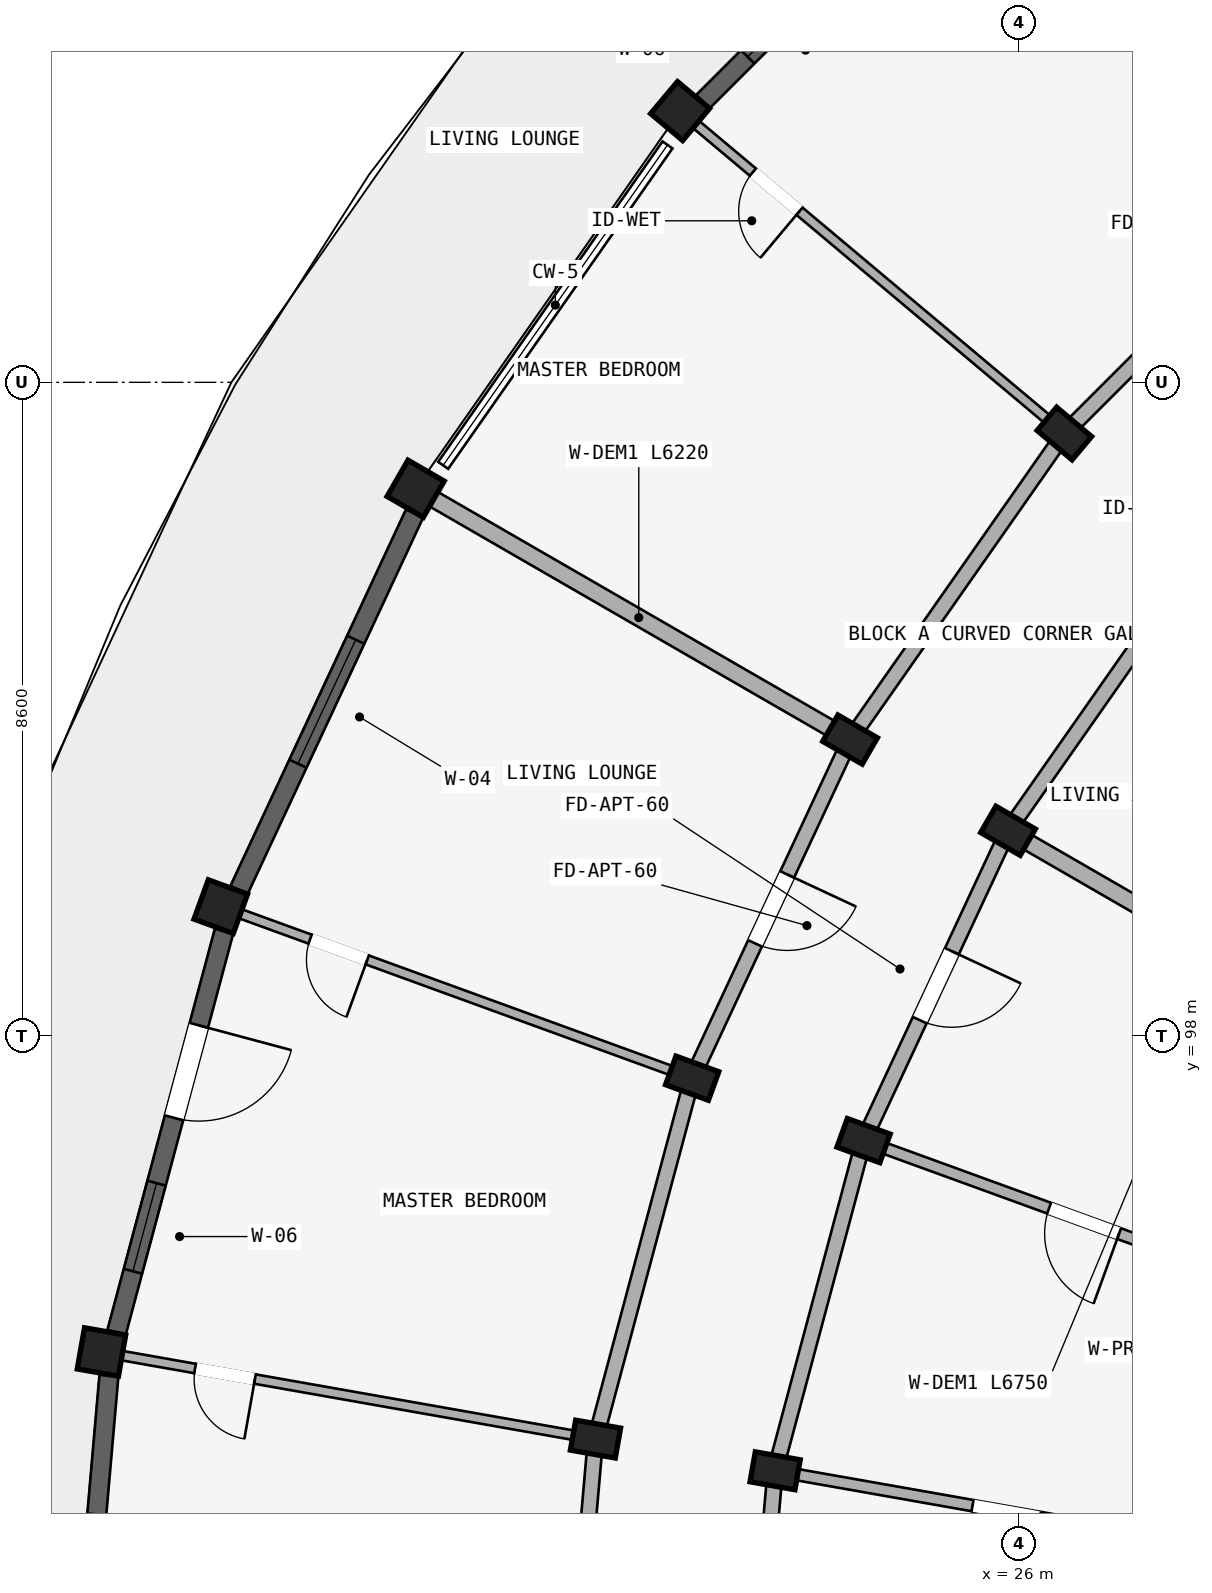
"""IFC4 building model, lengths in metres.
Left out: names, types, materials, properties, quantities, classifications, styles, units other than length and angle.
Written with IfcOpenShell. Run it as: python <this file> out.ifc"""

import sys

from ifc_helpers import new_model, si_unit, direction, frame, frame_2d, origin, origin_2d, place, context, subcontext, project, spatial, rectangle, extrude, element, fill, save


model = new_model("IFC4")
c1 = context("Model", 3, precision=1e-05, world=origin(), true_north=direction((0.0, 1.0)))
c2 = subcontext(c1, "Body", "Model", "MODEL_VIEW")
j1 = project(units=[si_unit("LENGTHUNIT", "METRE"), si_unit("PLANEANGLEUNIT", "RADIAN")], contexts=[c1])
p1 = place(None, origin())
s1 = spatial("IfcSite", under=j1, at=p1, CompositionType="ELEMENT")
p2 = place(p1, origin())
s2 = spatial("IfcBuilding", under=s1, at=p2, CompositionType="ELEMENT")
p3 = place(p2, frame((0.0, 0.0, 49.65)))
s3 = spatial("IfcBuildingStorey", under=s2, at=p3, CompositionType="ELEMENT", Elevation=49.65)
p4 = place(p3, frame((26.598, 105.927, 0.0), z_axis=(0.0, 0.0, 1.0), x_axis=(0.642787609687, 0.766044443119, 0.0)))
e1 = element("IfcColumn", 1, at=p4, inside=s3, PredefinedType="COLUMN", context=c2, shape_type="SweptSolid", body=[
    extrude(rectangle(XDim=0.4, YDim=0.6, at=origin_2d()), origin(), (0.0, 0.0, 1.0), 2.91),
])
p5 = place(p3, frame((21.542, 110.169, 0.0), z_axis=(0.0, 0.0, 1.0), x_axis=(0.642787609687, 0.766044443119, 0.0)))
e2 = element("IfcColumn", 2, at=p5, inside=s3, PredefinedType="COLUMN", context=c2, shape_type="SweptSolid", body=[
    extrude(rectangle(XDim=0.55, YDim=0.55, at=origin_2d()), origin(), (0.0, 0.0, 1.0), 2.91),
])
for number, where, z_axis, x_axis in (
    (3, (25.856, 100.7, 0.0), (0.0, 0.0, 1.0), (0.5, 0.866, 0.0)),
    (4, (23.778, 101.9, 0.0), (0.0, 0.0, 1.0), (0.5, 0.866, 0.0)),
):
    element("IfcColumn", number, at=place(p3, frame(where, z_axis=z_axis, x_axis=x_axis)), inside=s3, PredefinedType="COLUMN", context=c2, shape_type="SweptSolid", body=[
        extrude(rectangle(XDim=0.4, YDim=0.6, at=origin_2d()), origin(), (0.0, 0.0, 1.0), 2.91),
    ])
p6 = place(p3, frame((18.062, 105.2, 0.0), z_axis=(0.0, 0.0, 1.0), x_axis=(0.5, 0.866025403784, 0.0)))
e5 = element("IfcColumn", 5, at=p6, inside=s3, PredefinedType="COLUMN", context=c2, shape_type="SweptSolid", body=[
    extrude(rectangle(XDim=0.55, YDim=0.55, at=origin_2d()), origin(), (0.0, 0.0, 1.0), 2.91),
])
for number, where, z_axis, x_axis in (
    (6, (23.956, 96.624, 0.0), (0.0, 0.0, 1.0), (0.342, 0.94, 0.0)),
    (7, (21.701, 97.445, 0.0), (0.0, 0.0, 1.0), (0.342, 0.94, 0.0)),
):
    element("IfcColumn", number, at=place(p3, frame(where, z_axis=z_axis, x_axis=x_axis)), inside=s3, PredefinedType="COLUMN", context=c2, shape_type="SweptSolid", body=[
        extrude(rectangle(XDim=0.4, YDim=0.6, at=origin_2d()), origin(), (0.0, 0.0, 1.0), 2.91),
    ])
p7 = place(p3, frame((15.499, 99.702, 0.0), z_axis=(0.0, 0.0, 1.0), x_axis=(0.342020143326, 0.939692620786, 0.0)))
e8 = element("IfcColumn", 8, at=p7, inside=s3, PredefinedType="COLUMN", context=c2, shape_type="SweptSolid", body=[
    extrude(rectangle(XDim=0.55, YDim=0.55, at=origin_2d()), origin(), (0.0, 0.0, 1.0), 2.91),
])
for number, where, z_axis, x_axis in (
    (9, (22.792, 92.28, 0.0), (0.0, 0.0, 1.0), (0.174, 0.985, 0.0)),
    (10, (20.428, 92.697, 0.0), (0.0, 0.0, 1.0), (0.174, 0.985, 0.0)),
):
    element("IfcColumn", number, at=place(p3, frame(where, z_axis=z_axis, x_axis=x_axis)), inside=s3, PredefinedType="COLUMN", context=c2, shape_type="SweptSolid", body=[
        extrude(rectangle(XDim=0.4, YDim=0.6, at=origin_2d()), origin(), (0.0, 0.0, 1.0), 2.91),
    ])
p8 = place(p3, frame((13.929, 93.843, 0.0), z_axis=(0.0, 0.0, 1.0), x_axis=(0.173648177667, 0.984807753012, 0.0)))
e11 = element("IfcColumn", 11, at=p8, inside=s3, PredefinedType="COLUMN", context=c2, shape_type="SweptSolid", body=[
    extrude(rectangle(XDim=0.55, YDim=0.55, at=origin_2d()), origin(), (0.0, 0.0, 1.0), 2.91),
])
p9 = place(p3, frame((30.073, 109.402, 0.0), z_axis=(0.0, 0.0, 1.0), x_axis=(-0.707106781187, -0.707106781187, 0.0)))
e12 = element("IfcWall", 12, at=p9, inside=s3, PredefinedType="STANDARD", context=c2, shape_type="SweptSolid", body=[
    extrude(rectangle(XDim=4.916, YDim=0.2, at=frame_2d((2.458, 0.0))), origin(), (0.0, 0.0, 1.0), 2.352),
])
p10 = place(p9, frame((1.888, 0.0, 0.0)))
e13 = element("IfcOpeningElement", 13, at=p10, cuts=e12, PredefinedType="OPENING", context=c2, shape_type="SweptSolid", body=[
    extrude(rectangle(XDim=1.14, YDim=2.15, at=frame_2d((0.57, 1.075))), frame((0.0, 0.11, 0.0), z_axis=(0.0, -1.0, 0.0), x_axis=(1.0, 0.0, 0.0)), (0.0, 0.0, 1.0), 0.22),
])
p11 = place(p3, frame((28.436, 104.384, 0.0), z_axis=(0.0, 0.0, 1.0), x_axis=(-0.573571637217, -0.819155404658, 0.0)))
e14 = element("IfcWall", 14, at=p11, inside=s3, PredefinedType="STANDARD", context=c2, shape_type="SweptSolid", body=[
    extrude(rectangle(XDim=4.497, YDim=0.2, at=frame_2d((2.249, 0.0))), origin(), (0.0, 0.0, 1.0), 2.352),
])
p12 = place(p3, frame((26.598, 105.927, 0.0), z_axis=(0.0, 0.0, 1.0), x_axis=(-0.573592335331, -0.819140911474, 0.0)))
e15 = element("IfcWall", 15, at=p12, inside=s3, PredefinedType="STANDARD", context=c2, shape_type="SweptSolid", body=[
    extrude(rectangle(XDim=4.916, YDim=0.2, at=frame_2d((2.458, 0.0))), origin(), (0.0, 0.0, 1.0), 2.352),
])
p13 = place(p3, frame((25.856, 100.7, 0.0), z_axis=(0.0, 0.0, 1.0), x_axis=(-0.422617978463, -0.906307919131, 0.0)))
e16 = element("IfcWall", 16, at=p13, inside=s3, PredefinedType="STANDARD", context=c2, shape_type="SweptSolid", body=[
    extrude(rectangle(XDim=4.497, YDim=0.2, at=frame_2d((2.249, 0.0))), origin(), (0.0, 0.0, 1.0), 2.352),
])
p14 = place(p13, frame((1.749, 0.0, 0.0)))
e17 = element("IfcOpeningElement", 17, at=p14, cuts=e16, PredefinedType="OPENING", context=c2, shape_type="SweptSolid", body=[
    extrude(rectangle(XDim=1.0, YDim=2.15, at=frame_2d((0.5, 1.075))), frame((0.0, 0.11, 0.0), z_axis=(0.0, -1.0, 0.0), x_axis=(1.0, 0.0, 0.0)), (0.0, 0.0, 1.0), 0.22),
])
p15 = place(p3, frame((23.778, 101.9, 0.0), z_axis=(0.0, 0.0, 1.0), x_axis=(-0.422629854778, -0.906302381024, 0.0)))
e18 = element("IfcWall", 18, at=p15, inside=s3, PredefinedType="STANDARD", context=c2, shape_type="SweptSolid", body=[
    extrude(rectangle(XDim=4.915, YDim=0.2, at=frame_2d((2.458, 0.0))), origin(), (0.0, 0.0, 1.0), 2.352),
])
p16 = place(p15, frame((1.958, 0.0, 0.0)))
e19 = element("IfcOpeningElement", 19, at=p16, cuts=e18, PredefinedType="OPENING", context=c2, shape_type="SweptSolid", body=[
    extrude(rectangle(XDim=1.0, YDim=2.15, at=frame_2d((0.5, 1.075))), frame((0.0, 0.11, 0.0), z_axis=(0.0, -1.0, 0.0), x_axis=(1.0, 0.0, 0.0)), (0.0, 0.0, 1.0), 0.22),
])
p17 = place(p3, frame((23.956, 96.624, 0.0), z_axis=(0.0, 0.0, 1.0), x_axis=(-0.258787642463, -0.965934240054, 0.0)))
e20 = element("IfcWall", 20, at=p17, inside=s3, PredefinedType="STANDARD", context=c2, shape_type="SweptSolid", body=[
    extrude(rectangle(XDim=4.497, YDim=0.2, at=frame_2d((2.249, 0.0))), origin(), (0.0, 0.0, 1.0), 2.352),
])
p18 = place(p3, frame((21.701, 97.445, 0.0), z_axis=(0.0, 0.0, 1.0), x_axis=(-0.258803112091, -0.965930095386, 0.0)))
e21 = element("IfcWall", 21, at=p18, inside=s3, PredefinedType="STANDARD", context=c2, shape_type="SweptSolid", body=[
    extrude(rectangle(XDim=4.916, YDim=0.2, at=frame_2d((2.458, 0.0))), origin(), (0.0, 0.0, 1.0), 2.352),
])
p19 = place(p3, frame((22.792, 92.28, 0.0), z_axis=(0.0, 0.0, 1.0), x_axis=(-0.087187153726, -0.996191949488, 0.0)))
e22 = element("IfcWall", 22, at=p19, inside=s3, PredefinedType="STANDARD", context=c2, shape_type="SweptSolid", body=[
    extrude(rectangle(XDim=4.497, YDim=0.2, at=frame_2d((2.249, 0.0))), origin(), (0.0, 0.0, 1.0), 2.352),
])
p20 = place(p3, frame((20.428, 92.697, 0.0), z_axis=(0.0, 0.0, 1.0), x_axis=(-0.087167566415, -0.996193663584, 0.0)))
e23 = element("IfcWall", 23, at=p20, inside=s3, PredefinedType="STANDARD", context=c2, shape_type="SweptSolid", body=[
    extrude(rectangle(XDim=4.916, YDim=0.2, at=frame_2d((2.458, 0.0))), origin(), (0.0, 0.0, 1.0), 2.352),
])
p21 = place(p3, frame((30.009, 109.479, 0.0), z_axis=(0.0, 0.0, 1.0), x_axis=(-0.642771313427, 0.766058117009, 0.0)))
e24 = element("IfcWall", 24, at=p21, inside=s3, PredefinedType="STANDARD", context=c2, shape_type="SweptSolid", body=[
    extrude(rectangle(XDim=6.22, YDim=0.22, at=frame_2d((3.11, 0.0))), origin(), (0.0, 0.0, 1.0), 2.352),
])
p22 = place(p3, frame((26.521, 105.991, 0.0), z_axis=(0.0, 0.0, 1.0), x_axis=(-0.766058117009, 0.642771313427, 0.0)))
e25 = element("IfcWall", 25, at=p22, inside=s3, PredefinedType="PARTITIONING", context=c2, shape_type="SweptSolid", body=[
    extrude(rectangle(XDim=6.22, YDim=0.125, at=frame_2d((3.11, 0.0))), origin(), (0.0, 0.0, 1.0), 2.352),
])
p23 = place(p22, frame((4.45, 0.0, 0.0)))
e26 = element("IfcOpeningElement", 26, at=p23, cuts=e25, PredefinedType="OPENING", context=c2, shape_type="SweptSolid", body=[
    extrude(rectangle(XDim=0.8, YDim=2.1, at=frame_2d((0.4, 1.05))), frame((0.0, 0.073, 0.0), z_axis=(0.0, -1.0, 0.0), x_axis=(1.0, 0.0, 0.0)), (0.0, 0.0, 1.0), 0.145),
])
p24 = place(p3, frame((31.746, 97.3, 0.0), z_axis=(0.0, 0.0, 1.0), x_axis=(-0.866026575979, 0.499997969693, 0.0)))
e27 = element("IfcWall", 27, at=p24, inside=s3, PredefinedType="STANDARD", context=c2, shape_type="SweptSolid", body=[
    extrude(rectangle(XDim=6.75, YDim=0.22, at=frame_2d((3.375, 0.0))), origin(), (0.0, 0.0, 1.0), 2.352),
])
p25 = place(p3, frame((23.691, 101.95, 0.0), z_axis=(0.0, 0.0, 1.0), x_axis=(-0.866019562905, 0.500010116563, 0.0)))
e28 = element("IfcWall", 28, at=p25, inside=s3, PredefinedType="STANDARD", context=c2, shape_type="SweptSolid", body=[
    extrude(rectangle(XDim=6.22, YDim=0.22, at=frame_2d((3.11, 0.0))), origin(), (0.0, 0.0, 1.0), 2.352),
])
p26 = place(p3, frame((30.346, 94.298, 0.0), z_axis=(0.0, 0.0, 1.0), x_axis=(-0.939696231917, 0.342010221662, 0.0)))
e29 = element("IfcWall", 29, at=p26, inside=s3, PredefinedType="PARTITIONING", context=c2, shape_type="SweptSolid", body=[
    extrude(rectangle(XDim=6.75, YDim=0.15, at=frame_2d((3.375, 0.0))), origin(), (0.0, 0.0, 1.0), 2.352),
])
p27 = place(p26, frame((3.222, 0.0, 0.0)))
e30 = element("IfcOpeningElement", 30, at=p27, cuts=e29, PredefinedType="OPENING", context=c2, shape_type="SweptSolid", body=[
    extrude(rectangle(XDim=0.98, YDim=2.12, at=frame_2d((0.49, 1.06))), frame((0.0, 0.085, 0.0), z_axis=(0.0, -1.0, 0.0), x_axis=(1.0, 0.0, 0.0)), (0.0, 0.0, 1.0), 0.17),
])
p28 = place(p3, frame((21.607, 97.479, 0.0), z_axis=(0.0, 0.0, 1.0), x_axis=(-0.939702855871, 0.341992021352, 0.0)))
e31 = element("IfcWall", 31, at=p28, inside=s3, PredefinedType="PARTITIONING", context=c2, shape_type="SweptSolid", body=[
    extrude(rectangle(XDim=6.22, YDim=0.125, at=frame_2d((3.11, 0.0))), origin(), (0.0, 0.0, 1.0), 2.352),
])
p29 = place(p28, frame((4.45, 0.0, 0.0)))
e32 = element("IfcOpeningElement", 32, at=p29, cuts=e31, PredefinedType="OPENING", context=c2, shape_type="SweptSolid", body=[
    extrude(rectangle(XDim=0.8, YDim=2.1, at=frame_2d((0.4, 1.05))), frame((0.0, 0.073, 0.0), z_axis=(0.0, -1.0, 0.0), x_axis=(1.0, 0.0, 0.0)), (0.0, 0.0, 1.0), 0.145),
])
p30 = place(p3, frame((29.489, 91.099, 0.0), z_axis=(0.0, 0.0, 1.0), x_axis=(-0.984807944945, 0.173647089161, 0.0)))
e33 = element("IfcWall", 33, at=p30, inside=s3, PredefinedType="PARTITIONING", context=c2, shape_type="SweptSolid", body=[
    extrude(rectangle(XDim=6.75, YDim=0.15, at=frame_2d((3.375, 0.0))), origin(), (0.0, 0.0, 1.0), 2.352),
])
p31 = place(p30, frame((3.262, 0.0, 0.0)))
e34 = element("IfcOpeningElement", 34, at=p31, cuts=e33, PredefinedType="OPENING", context=c2, shape_type="SweptSolid", body=[
    extrude(rectangle(XDim=0.9, YDim=2.1, at=frame_2d((0.45, 1.05))), frame((0.0, 0.085, 0.0), z_axis=(0.0, -1.0, 0.0), x_axis=(1.0, 0.0, 0.0)), (0.0, 0.0, 1.0), 0.17),
])
p32 = place(p3, frame((20.33, 92.714, 0.0), z_axis=(0.0, 0.0, 1.0), x_axis=(-0.98480804799, 0.173646504755, 0.0)))
e35 = element("IfcWall", 35, at=p32, inside=s3, PredefinedType="PARTITIONING", context=c2, shape_type="SweptSolid", body=[
    extrude(rectangle(XDim=6.22, YDim=0.125, at=frame_2d((3.11, 0.0))), origin(), (0.0, 0.0, 1.0), 2.352),
])
p33 = place(p32, frame((4.45, 0.0, 0.0)))
e36 = element("IfcOpeningElement", 36, at=p33, cuts=e35, PredefinedType="OPENING", context=c2, shape_type="SweptSolid", body=[
    extrude(rectangle(XDim=0.8, YDim=2.1, at=frame_2d((0.4, 1.05))), frame((0.0, 0.073, 0.0), z_axis=(0.0, -1.0, 0.0), x_axis=(1.0, 0.0, 0.0)), (0.0, 0.0, 1.0), 0.145),
])
p34 = place(p3, frame((25.707, 114.157, 0.0), z_axis=(0.0, 0.0, 1.0), x_axis=(-0.707106781187, -0.707106781187, 0.0)))
e37 = element("IfcWall", 37, at=p34, inside=s3, PredefinedType="STANDARD", context=c2, shape_type="SweptSolid", body=[
    extrude(rectangle(XDim=5.465, YDim=0.25, at=frame_2d((2.732, 0.0))), origin(), (0.0, 0.0, 1.0), 2.352),
])
p35 = place(p34, frame((3.432, 0.0, 0.402)))
e38 = element("IfcOpeningElement", 38, at=p35, cuts=e37, PredefinedType="OPENING", context=c2, shape_type="SweptSolid", body=[
    extrude(rectangle(XDim=1.2, YDim=1.5, at=frame_2d((0.6, 0.75))), frame((0.0, 0.135, 0.0), z_axis=(0.0, -1.0, 0.0), x_axis=(1.0, 0.0, 0.0)), (0.0, 0.0, 1.0), 0.27),
])
p36 = place(p34, frame((1.283, 0.0, 0.0)))
e39 = element("IfcOpeningElement", 39, at=p36, cuts=e37, PredefinedType="OPENING", context=c2, shape_type="SweptSolid", body=[
    extrude(rectangle(XDim=1.26, YDim=2.15, at=frame_2d((0.63, 1.075))), frame((0.0, 0.135, 0.0), z_axis=(0.0, -1.0, 0.0), x_axis=(1.0, 0.0, 0.0)), (0.0, 0.0, 1.0), 0.27),
])
p37 = place(p3, frame((18.049, 104.875, 0.0), z_axis=(0.0, 0.0, 1.0), x_axis=(-0.422618868643, -0.906307504033, 0.0)))
e40 = element("IfcWall", 40, at=p37, inside=s3, PredefinedType="STANDARD", context=c2, shape_type="SweptSolid", body=[
    extrude(rectangle(XDim=5.465, YDim=0.25, at=frame_2d((2.732, 0.0))), origin(), (0.0, 0.0, 1.0), 2.352),
])
p38 = place(p37, frame((1.833, 0.0, 0.502)))
e41 = element("IfcOpeningElement", 41, at=p38, cuts=e40, PredefinedType="OPENING", context=c2, shape_type="SweptSolid", body=[
    extrude(rectangle(XDim=1.8, YDim=1.65, at=frame_2d((0.9, 0.825))), frame((0.0, 0.135, 0.0), z_axis=(0.0, -1.0, 0.0), x_axis=(1.0, 0.0, 0.0)), (0.0, 0.0, 1.0), 0.27),
])
p39 = place(p3, frame((15.542, 99.38, 0.0), z_axis=(0.0, 0.0, 1.0), x_axis=(-0.258835824038, -0.965921330231, 0.0)))
e42 = element("IfcWall", 42, at=p39, inside=s3, PredefinedType="STANDARD", context=c2, shape_type="SweptSolid", body=[
    extrude(rectangle(XDim=5.465, YDim=0.25, at=frame_2d((2.732, 0.0))), origin(), (0.0, 0.0, 1.0), 2.352),
])
p40 = place(p39, frame((3.432, 0.0, 0.402)))
e43 = element("IfcOpeningElement", 43, at=p40, cuts=e42, PredefinedType="OPENING", context=c2, shape_type="SweptSolid", body=[
    extrude(rectangle(XDim=1.2, YDim=1.5, at=frame_2d((0.6, 0.75))), frame((0.0, 0.135, 0.0), z_axis=(0.0, -1.0, 0.0), x_axis=(1.0, 0.0, 0.0)), (0.0, 0.0, 1.0), 0.27),
])
p41 = place(p39, frame((1.283, 0.0, 0.0)))
e44 = element("IfcOpeningElement", 44, at=p41, cuts=e42, PredefinedType="OPENING", context=c2, shape_type="SweptSolid", body=[
    extrude(rectangle(XDim=1.26, YDim=2.15, at=frame_2d((0.63, 1.075))), frame((0.0, 0.135, 0.0), z_axis=(0.0, -1.0, 0.0), x_axis=(1.0, 0.0, 0.0)), (0.0, 0.0, 1.0), 0.27),
])
p42 = place(p3, frame((14.027, 93.533, 0.0), z_axis=(0.0, 0.0, 1.0), x_axis=(-0.087159745848, -0.996194347858, 0.0)))
e45 = element("IfcWall", 45, at=p42, inside=s3, PredefinedType="STANDARD", context=c2, shape_type="SweptSolid", body=[
    extrude(rectangle(XDim=5.465, YDim=0.25, at=frame_2d((2.732, 0.0))), origin(), (0.0, 0.0, 1.0), 2.352),
])
p43 = place(p42, frame((1.833, 0.0, 0.502)))
e46 = element("IfcOpeningElement", 46, at=p43, cuts=e45, PredefinedType="OPENING", context=c2, shape_type="SweptSolid", body=[
    extrude(rectangle(XDim=1.8, YDim=1.65, at=frame_2d((0.9, 0.825))), frame((0.0, 0.135, 0.0), z_axis=(0.0, -1.0, 0.0), x_axis=(1.0, 0.0, 0.0)), (0.0, 0.0, 1.0), 0.27),
])
p44 = place(p35, origin())
e47 = element("IfcWindow", 47, at=p44, inside=s3, PartitioningType="SINGLE_PANEL", PredefinedType="WINDOW", context=c2, shape_type="SweptSolid", body=[
    extrude(rectangle(XDim=1.2, YDim=1.5, at=frame_2d((0.6, 0.75))), frame((0.0, 0.03, 0.0), z_axis=(0.0, -1.0, 0.0), x_axis=(1.0, 0.0, 0.0)), (0.0, 0.0, 1.0), 0.06),
])
fill(e38, e47)
p45 = place(p38, origin())
e48 = element("IfcWindow", 48, at=p45, inside=s3, PartitioningType="DOUBLE_PANEL_VERTICAL", PredefinedType="WINDOW", context=c2, shape_type="SweptSolid", body=[
    extrude(rectangle(XDim=1.8, YDim=1.65, at=frame_2d((0.9, 0.825))), frame((0.0, 0.03, 0.0), z_axis=(0.0, -1.0, 0.0), x_axis=(1.0, 0.0, 0.0)), (0.0, 0.0, 1.0), 0.06),
])
fill(e41, e48)
p46 = place(p40, origin())
e49 = element("IfcWindow", 49, at=p46, inside=s3, PartitioningType="SINGLE_PANEL", PredefinedType="WINDOW", context=c2, shape_type="SweptSolid", body=[
    extrude(rectangle(XDim=1.2, YDim=1.5, at=frame_2d((0.6, 0.75))), frame((0.0, 0.03, 0.0), z_axis=(0.0, -1.0, 0.0), x_axis=(1.0, 0.0, 0.0)), (0.0, 0.0, 1.0), 0.06),
])
fill(e43, e49)
p47 = place(p23, frame((0.8, 0.0, 0.0), z_axis=(0.0, 0.0, 1.0), x_axis=(-1.0, 0.0, 0.0)))
e50 = element("IfcDoor", 50, at=p47, inside=s3, OperationType="SINGLE_SWING_RIGHT", PredefinedType="DOOR", context=c2, shape_type="SweptSolid", body=[
    extrude(rectangle(XDim=0.8, YDim=2.1, at=frame_2d((0.4, 1.05))), frame((0.0, 0.025, 0.0), z_axis=(0.0, -1.0, 0.0), x_axis=(1.0, 0.0, 0.0)), (0.0, 0.0, 1.0), 0.05),
])
fill(e26, e50)
p48 = place(p27, origin())
e51 = element("IfcDoor", 51, at=p48, inside=s3, OperationType="SINGLE_SWING_LEFT", PredefinedType="DOOR", context=c2, shape_type="SweptSolid", body=[
    extrude(rectangle(XDim=0.98, YDim=2.12, at=frame_2d((0.49, 1.06))), frame((0.0, 0.025, 0.0), z_axis=(0.0, -1.0, 0.0), x_axis=(1.0, 0.0, 0.0)), (0.0, 0.0, 1.0), 0.05),
])
fill(e30, e51)
p49 = place(p29, frame((0.8, 0.0, 0.0), z_axis=(0.0, 0.0, 1.0), x_axis=(-1.0, 0.0, 0.0)))
e52 = element("IfcDoor", 52, at=p49, inside=s3, OperationType="SINGLE_SWING_RIGHT", PredefinedType="DOOR", context=c2, shape_type="SweptSolid", body=[
    extrude(rectangle(XDim=0.8, YDim=2.1, at=frame_2d((0.4, 1.05))), frame((0.0, 0.025, 0.0), z_axis=(0.0, -1.0, 0.0), x_axis=(1.0, 0.0, 0.0)), (0.0, 0.0, 1.0), 0.05),
])
fill(e32, e52)
p50 = place(p31, origin())
e53 = element("IfcDoor", 53, at=p50, inside=s3, OperationType="SINGLE_SWING_LEFT", PredefinedType="DOOR", context=c2, shape_type="SweptSolid", body=[
    extrude(rectangle(XDim=0.9, YDim=2.1, at=frame_2d((0.45, 1.05))), frame((0.0, 0.025, 0.0), z_axis=(0.0, -1.0, 0.0), x_axis=(1.0, 0.0, 0.0)), (0.0, 0.0, 1.0), 0.05),
])
fill(e34, e53)
p51 = place(p33, frame((0.8, 0.0, 0.0), z_axis=(0.0, 0.0, 1.0), x_axis=(-1.0, 0.0, 0.0)))
e54 = element("IfcDoor", 54, at=p51, inside=s3, OperationType="SINGLE_SWING_RIGHT", PredefinedType="DOOR", context=c2, shape_type="SweptSolid", body=[
    extrude(rectangle(XDim=0.8, YDim=2.1, at=frame_2d((0.4, 1.05))), frame((0.0, 0.025, 0.0), z_axis=(0.0, -1.0, 0.0), x_axis=(1.0, 0.0, 0.0)), (0.0, 0.0, 1.0), 0.05),
])
fill(e36, e54)
p52 = place(p16, frame((1.0, 0.0, 0.0), z_axis=(0.0, 0.0, 1.0), x_axis=(-1.0, 0.0, 0.0)))
e55 = element("IfcDoor", 55, at=p52, inside=s3, OperationType="SINGLE_SWING_RIGHT", PredefinedType="DOOR", context=c2, shape_type="SweptSolid", body=[
    extrude(rectangle(XDim=1.0, YDim=2.15, at=frame_2d((0.5, 1.075))), frame((0.0, 0.025, 0.0), z_axis=(0.0, -1.0, 0.0), x_axis=(1.0, 0.0, 0.0)), (0.0, 0.0, 1.0), 0.05),
])
fill(e19, e55)
p53 = place(p14, origin())
e56 = element("IfcDoor", 56, at=p53, inside=s3, OperationType="SINGLE_SWING_LEFT", PredefinedType="DOOR", context=c2, shape_type="SweptSolid", body=[
    extrude(rectangle(XDim=1.0, YDim=2.15, at=frame_2d((0.5, 1.075))), frame((0.0, 0.025, 0.0), z_axis=(0.0, -1.0, 0.0), x_axis=(1.0, 0.0, 0.0)), (0.0, 0.0, 1.0), 0.05),
])
fill(e17, e56)
p54 = place(p41, frame((1.26, 0.0, 0.0), z_axis=(0.0, 0.0, 1.0), x_axis=(-1.0, 0.0, 0.0)))
e57 = element("IfcDoor", 57, at=p54, inside=s3, OperationType="SINGLE_SWING_RIGHT", PredefinedType="DOOR", context=c2, shape_type="SweptSolid", body=[
    extrude(rectangle(XDim=1.26, YDim=2.15, at=frame_2d((0.63, 1.075))), frame((0.0, 0.025, 0.0), z_axis=(0.0, -1.0, 0.0), x_axis=(1.0, 0.0, 0.0)), (0.0, 0.0, 1.0), 0.05),
])
fill(e44, e57)
save(model, sys.argv[1])
